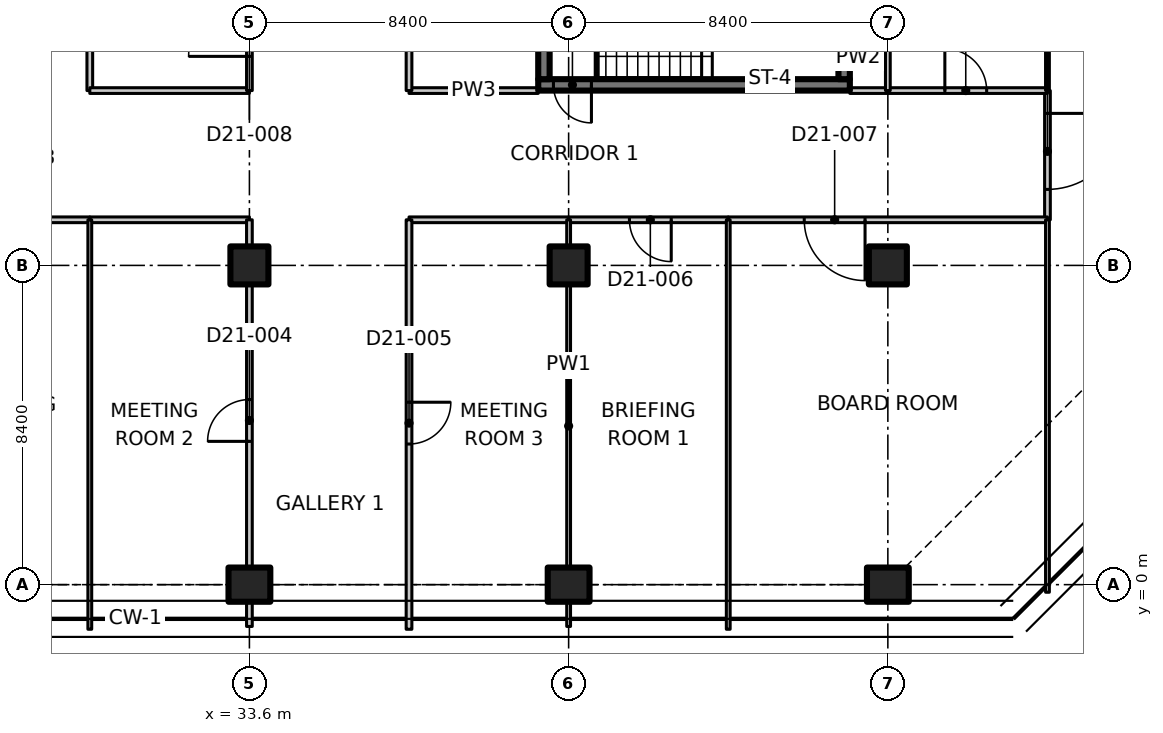
"""IFC4 building model, lengths in metres.
Left out: names, types, materials, properties, quantities, classifications, styles, units other than length and angle.
Written with IfcOpenShell. Run it as: python <this file> out.ifc"""

import sys

from ifc_helpers import new_model, si_unit, direction, frame, frame_2d, origin, origin_2d, place, context, subcontext, project, spatial, polyline, rectangle, outline, extrude, element, fill, save


model = new_model("IFC4")
c1 = context("Model", 3, precision=1e-05, world=origin(), true_north=direction((0.0, 1.0)))
c2 = subcontext(c1, "Body", "Model", "MODEL_VIEW")
j1 = project(units=[si_unit("LENGTHUNIT", "METRE"), si_unit("PLANEANGLEUNIT", "RADIAN")], contexts=[c1])
p1 = place(None, origin())
s1 = spatial("IfcSite", under=j1, at=p1, CompositionType="ELEMENT")
p2 = place(p1, origin())
s2 = spatial("IfcBuilding", under=s1, at=p2, CompositionType="ELEMENT")
p3 = place(p2, frame((0.0, 0.0, 166.8)))
s3 = spatial("IfcBuildingStorey", under=s2, at=p3, CompositionType="ELEMENT", Elevation=166.8)
p4 = place(p3, frame((33.6, 0.0, 0.0), z_axis=(0.0, 0.0, 1.0), x_axis=(0.0, 1.0, 0.0)))
e1 = element("IfcColumn", 1, at=p4, inside=s3, PredefinedType="COLUMN", context=c2, shape_type="SweptSolid", body=[
    extrude(rectangle(XDim=0.9, YDim=1.1, at=origin_2d()), origin(), (0.0, 0.0, 1.0), 3.35),
])
p5 = place(p3, frame((33.6, 8.4, 0.0), z_axis=(0.0, 0.0, 1.0), x_axis=(1.0, 0.0, 0.0)))
e2 = element("IfcColumn", 2, at=p5, inside=s3, PredefinedType="COLUMN", context=c2, shape_type="SweptSolid", body=[
    extrude(rectangle(XDim=1.0, YDim=1.0, at=origin_2d()), origin(), (0.0, 0.0, 1.0), 3.35),
])
p6 = place(p3, frame((42.0, 0.0, 0.0), z_axis=(0.0, 0.0, 1.0), x_axis=(0.0, 1.0, 0.0)))
e3 = element("IfcColumn", 3, at=p6, inside=s3, PredefinedType="COLUMN", context=c2, shape_type="SweptSolid", body=[
    extrude(rectangle(XDim=0.9, YDim=1.1, at=origin_2d()), origin(), (0.0, 0.0, 1.0), 3.35),
])
p7 = place(p3, frame((42.0, 8.4, 0.0), z_axis=(0.0, 0.0, 1.0), x_axis=(1.0, 0.0, 0.0)))
e4 = element("IfcColumn", 4, at=p7, inside=s3, PredefinedType="COLUMN", context=c2, shape_type="SweptSolid", body=[
    extrude(rectangle(XDim=1.0, YDim=1.0, at=origin_2d()), origin(), (0.0, 0.0, 1.0), 3.35),
])
p8 = place(p3, frame((50.4, 0.0, 0.0), z_axis=(0.0, 0.0, 1.0), x_axis=(0.0, 1.0, 0.0)))
e5 = element("IfcColumn", 5, at=p8, inside=s3, PredefinedType="COLUMN", context=c2, shape_type="SweptSolid", body=[
    extrude(rectangle(XDim=0.9, YDim=1.1, at=origin_2d()), origin(), (0.0, 0.0, 1.0), 3.35),
])
p9 = place(p3, frame((50.4, 8.4, 0.0), z_axis=(0.0, 0.0, 1.0), x_axis=(1.0, 0.0, 0.0)))
e6 = element("IfcColumn", 6, at=p9, inside=s3, PredefinedType="COLUMN", context=c2, shape_type="SweptSolid", body=[
    extrude(rectangle(XDim=1.0, YDim=1.0, at=origin_2d()), origin(), (0.0, 0.0, 1.0), 3.35),
])
p10 = place(p3, frame((49.4, 13.15, 0.0), z_axis=(0.0, 0.0, 1.0), x_axis=(-1.0, 0.0, 0.0)))
e7 = element("IfcWall", 7, at=p10, inside=s3, PredefinedType="SHEAR", context=c2, shape_type="SweptSolid", body=[
    extrude(rectangle(XDim=8.2, YDim=0.3, at=frame_2d((4.1, 0.0))), origin(), (0.0, 0.0, 1.0), 3.35),
])
p11 = place(p10, frame((6.8, 0.0, 0.0)))
e8 = element("IfcOpeningElement", 8, at=p11, cuts=e7, PredefinedType="OPENING", context=c2, shape_type="SweptSolid", body=[
    extrude(rectangle(XDim=1.0, YDim=2.1, at=frame_2d((0.5, 1.05))), frame((0.0, 0.16, 0.0), z_axis=(0.0, -1.0, 0.0), x_axis=(1.0, 0.0, 0.0)), (0.0, 0.0, 1.0), 0.32),
])
for number, where, z_axis, x_axis in (
    (9, (41.35, 13.3, 0.0), (0.0, 0.0, 1.0), (0.0, 1.0, 0.0)),
    (10, (49.25, 13.3, 0.0), (0.0, 0.0, 1.0), (0.0, 1.0, 0.0)),
):
    element("IfcWall", number, at=place(p3, frame(where, z_axis=z_axis, x_axis=x_axis)), inside=s3, PredefinedType="SHEAR", context=c2, shape_type="SweptSolid", body=[
        extrude(rectangle(XDim=2.55, YDim=0.3, at=frame_2d((1.275, 0.0))), origin(), (0.0, 0.0, 1.0), 3.35),
    ])
p12 = place(p3, frame((29.4, 9.6, 0.0), z_axis=(0.0, 0.0, 1.0), x_axis=(-1.0, 0.0, 0.0)))
e11 = element("IfcWall", 11, at=p12, inside=s3, PredefinedType="PARTITIONING", context=c2, shape_type="SweptSolid", body=[
    extrude(rectangle(XDim=4.2, YDim=0.15, at=frame_2d((2.1, 0.0))), origin(), (0.0, 0.0, 1.0), 3.33),
])
p13 = place(p12, frame((1.5, 0.0, 0.0)))
e12 = element("IfcOpeningElement", 12, at=p13, cuts=e11, PredefinedType="OPENING", context=c2, shape_type="SweptSolid", body=[
    extrude(rectangle(XDim=1.1, YDim=2.1, at=frame_2d((0.55, 1.05))), frame((0.0, 0.085, 0.0), z_axis=(0.0, -1.0, 0.0), x_axis=(1.0, 0.0, 0.0)), (0.0, 0.0, 1.0), 0.17),
])
p14 = place(p3, frame((29.4, 21.2, 0.0), z_axis=(0.0, 0.0, 1.0), x_axis=(0.0, -1.0, 0.0)))
e13 = element("IfcWall", 13, at=p14, inside=s3, PredefinedType="PARTITIONING", context=c2, shape_type="SweptSolid", body=[
    extrude(rectangle(XDim=8.2, YDim=0.15, at=frame_2d((4.1, 0.0))), origin(), (0.0, 0.0, 1.0), 3.33),
])
p15 = place(p3, frame((54.6, 13.0, 0.0), z_axis=(0.0, 0.0, 1.0), x_axis=(0.0, -1.0, 0.0)))
e14 = element("IfcWall", 14, at=p15, inside=s3, PredefinedType="PARTITIONING", context=c2, shape_type="SweptSolid", body=[
    extrude(rectangle(XDim=3.4, YDim=0.15, at=frame_2d((1.7, 0.0))), origin(), (0.0, 0.0, 1.0), 3.33),
])
p16 = place(p15, frame((0.6, 0.0, 0.0)))
e15 = element("IfcOpeningElement", 15, at=p16, cuts=e14, PredefinedType="OPENING", context=c2, shape_type="SweptSolid", body=[
    extrude(rectangle(XDim=2.0, YDim=2.4, at=frame_2d((1.0, 1.2))), frame((0.0, 0.085, 0.0), z_axis=(0.0, -1.0, 0.0), x_axis=(1.0, 0.0, 0.0)), (0.0, 0.0, 1.0), 0.17),
])
p17 = place(p3, frame((33.6, 9.6, 0.0), z_axis=(0.0, 0.0, 1.0), x_axis=(-1.0, 0.0, 0.0)))
e16 = element("IfcWall", 16, at=p17, inside=s3, PredefinedType="PARTITIONING", context=c2, shape_type="SweptSolid", body=[
    extrude(rectangle(XDim=4.2, YDim=0.15, at=frame_2d((2.1, 0.0))), origin(), (0.0, 0.0, 1.0), 3.33),
])
p18 = place(p3, frame((42.0, 9.6, 0.0), z_axis=(0.0, 0.0, 1.0), x_axis=(-1.0, 0.0, 0.0)))
e17 = element("IfcWall", 17, at=p18, inside=s3, PredefinedType="PARTITIONING", context=c2, shape_type="SweptSolid", body=[
    extrude(rectangle(XDim=4.2, YDim=0.15, at=frame_2d((2.1, 0.0))), origin(), (0.0, 0.0, 1.0), 3.33),
])
p19 = place(p3, frame((46.2, 9.6, 0.0), z_axis=(0.0, 0.0, 1.0), x_axis=(-1.0, 0.0, 0.0)))
e18 = element("IfcWall", 18, at=p19, inside=s3, PredefinedType="PARTITIONING", context=c2, shape_type="SweptSolid", body=[
    extrude(rectangle(XDim=4.2, YDim=0.15, at=frame_2d((2.1, 0.0))), origin(), (0.0, 0.0, 1.0), 3.33),
])
p20 = place(p19, frame((1.5, 0.0, 0.0)))
e19 = element("IfcOpeningElement", 19, at=p20, cuts=e18, PredefinedType="OPENING", context=c2, shape_type="SweptSolid", body=[
    extrude(rectangle(XDim=1.1, YDim=2.1, at=frame_2d((0.55, 1.05))), frame((0.0, 0.085, 0.0), z_axis=(0.0, -1.0, 0.0), x_axis=(1.0, 0.0, 0.0)), (0.0, 0.0, 1.0), 0.17),
])
p21 = place(p3, frame((54.6, 9.6, 0.0), z_axis=(0.0, 0.0, 1.0), x_axis=(-1.0, 0.0, 0.0)))
e20 = element("IfcWall", 20, at=p21, inside=s3, PredefinedType="PARTITIONING", context=c2, shape_type="SweptSolid", body=[
    extrude(rectangle(XDim=8.4, YDim=0.15, at=frame_2d((4.2, 0.0))), origin(), (0.0, 0.0, 1.0), 3.33),
])
p22 = place(p21, frame((4.8, 0.0, 0.0)))
e21 = element("IfcOpeningElement", 21, at=p22, cuts=e20, PredefinedType="OPENING", context=c2, shape_type="SweptSolid", body=[
    extrude(rectangle(XDim=1.6, YDim=2.1, at=frame_2d((0.8, 1.05))), frame((0.0, 0.085, 0.0), z_axis=(0.0, -1.0, 0.0), x_axis=(1.0, 0.0, 0.0)), (0.0, 0.0, 1.0), 0.17),
])
p23 = place(p3, frame((29.4, 13.0, 0.0), z_axis=(0.0, 0.0, 1.0), x_axis=(1.0, 0.0, 0.0)))
e22 = element("IfcWall", 22, at=p23, inside=s3, PredefinedType="PARTITIONING", context=c2, shape_type="SweptSolid", body=[
    extrude(rectangle(XDim=4.2, YDim=0.15, at=frame_2d((2.1, 0.0))), origin(), (0.0, 0.0, 1.0), 3.33),
])
p24 = place(p3, frame((37.8, 13.0, 0.0), z_axis=(0.0, 0.0, 1.0), x_axis=(1.0, 0.0, 0.0)))
e23 = element("IfcWall", 23, at=p24, inside=s3, PredefinedType="PARTITIONING", context=c2, shape_type="SweptSolid", body=[
    extrude(rectangle(XDim=3.4, YDim=0.15, at=frame_2d((1.7, 0.0))), origin(), (0.0, 0.0, 1.0), 3.33),
])
p25 = place(p3, frame((49.4, 13.0, 0.0), z_axis=(0.0, 0.0, 1.0), x_axis=(1.0, 0.0, 0.0)))
e24 = element("IfcWall", 24, at=p25, inside=s3, PredefinedType="PARTITIONING", context=c2, shape_type="SweptSolid", body=[
    extrude(rectangle(XDim=1.0, YDim=0.15, at=frame_2d((0.5, 0.0))), origin(), (0.0, 0.0, 1.0), 3.33),
])
p26 = place(p3, frame((50.4, 13.0, 0.0), z_axis=(0.0, 0.0, 1.0), x_axis=(1.0, 0.0, 0.0)))
e25 = element("IfcWall", 25, at=p26, inside=s3, PredefinedType="PARTITIONING", context=c2, shape_type="SweptSolid", body=[
    extrude(rectangle(XDim=4.2, YDim=0.15, at=frame_2d((2.1, 0.0))), origin(), (0.0, 0.0, 1.0), 3.33),
])
p27 = place(p26, frame((1.5, 0.0, 0.0)))
e26 = element("IfcOpeningElement", 26, at=p27, cuts=e25, PredefinedType="OPENING", context=c2, shape_type="SweptSolid", body=[
    extrude(rectangle(XDim=1.1, YDim=2.1, at=frame_2d((0.55, 1.05))), frame((0.0, 0.085, 0.0), z_axis=(0.0, -1.0, 0.0), x_axis=(1.0, 0.0, 0.0)), (0.0, 0.0, 1.0), 0.17),
])
p28 = place(p3, frame((54.6, -0.2, 0.0), z_axis=(0.0, 0.0, 1.0), x_axis=(0.0, 1.0, 0.0)))
e27 = element("IfcWall", 27, at=p28, inside=s3, PredefinedType="PARTITIONING", context=c2, shape_type="SweptSolid", body=[
    extrude(outline(polyline([(0.0, 0.0), (9.8, 0.0), (9.8, 3.33), (5.066, 3.33), (5.064, 2.98), (3.736, 2.98), (3.734, 3.33), (0.0, 3.33), (0.0, 0.0)])), frame((0.0, 0.05, 0.0), z_axis=(0.0, -1.0, 0.0), x_axis=(1.0, 0.0, 0.0)), (0.0, 0.0, 1.0), 0.1),
])
p29 = place(p3, frame((54.6, 13.0, 0.0), z_axis=(0.0, 0.0, 1.0), x_axis=(0.0, 1.0, 0.0)))
e28 = element("IfcWall", 28, at=p29, inside=s3, PredefinedType="PARTITIONING", context=c2, shape_type="SweptSolid", body=[
    extrude(outline(polyline([(0.0, 0.0), (12.805, 0.0), (12.805, 3.33), (12.4, 3.33), (8.666, 3.33), (8.664, 2.98), (7.336, 2.98), (7.334, 3.33), (0.0, 3.33), (0.0, 0.0)])), frame((0.0, 0.05, 0.0), z_axis=(0.0, -1.0, 0.0), x_axis=(1.0, 0.0, 0.0)), (0.0, 0.0, 1.0), 0.1),
])
p30 = place(p3, frame((33.6, -1.1, 0.0), z_axis=(0.0, 0.0, 1.0), x_axis=(0.0, 1.0, 0.0)))
e29 = element("IfcWall", 29, at=p30, inside=s3, PredefinedType="PARTITIONING", context=c2, shape_type="SweptSolid", body=[
    extrude(rectangle(XDim=0.63, YDim=0.15, at=frame_2d((0.315, 0.0))), origin(), (0.0, 0.0, 1.0), 3.33),
])
p31 = place(p3, frame((33.6, 0.47, 0.0), z_axis=(0.0, 0.0, 1.0), x_axis=(0.0, 1.0, 0.0)))
e30 = element("IfcWall", 30, at=p31, inside=s3, PredefinedType="PARTITIONING", context=c2, shape_type="SweptSolid", body=[
    extrude(rectangle(XDim=7.41, YDim=0.15, at=frame_2d((3.705, 0.0))), origin(), (0.0, 0.0, 1.0), 3.33),
])
p32 = place(p31, frame((3.3, 0.0, 0.0)))
e31 = element("IfcOpeningElement", 31, at=p32, cuts=e30, PredefinedType="OPENING", context=c2, shape_type="SweptSolid", body=[
    extrude(rectangle(XDim=1.1, YDim=2.1, at=frame_2d((0.55, 1.05))), frame((0.0, 0.085, 0.0), z_axis=(0.0, -1.0, 0.0), x_axis=(1.0, 0.0, 0.0)), (0.0, 0.0, 1.0), 0.17),
])
p33 = place(p3, frame((33.6, 8.92, 0.0), z_axis=(0.0, 0.0, 1.0), x_axis=(0.0, 1.0, 0.0)))
e32 = element("IfcWall", 32, at=p33, inside=s3, PredefinedType="PARTITIONING", context=c2, shape_type="SweptSolid", body=[
    extrude(rectangle(XDim=0.68, YDim=0.15, at=frame_2d((0.34, 0.0))), origin(), (0.0, 0.0, 1.0), 3.33),
])
p34 = place(p3, frame((37.8, 9.6, 0.0), z_axis=(0.0, 0.0, 1.0), x_axis=(0.0, -1.0, 0.0)))
e33 = element("IfcWall", 33, at=p34, inside=s3, PredefinedType="PARTITIONING", context=c2, shape_type="SweptSolid", body=[
    extrude(outline(polyline([(0.0, 0.0), (10.774, 0.0), (10.774, 3.33), (10.7, 3.33), (10.05, 3.33), (10.048, 2.98), (9.152, 2.98), (9.15, 3.33), (0.0, 3.33), (0.0, 0.0)])), frame((0.0, 0.075, 0.0), z_axis=(0.0, -1.0, 0.0), x_axis=(1.0, 0.0, 0.0)), (0.0, 0.0, 1.0), 0.15),
])
p35 = place(p34, frame((4.8, 0.0, 0.0)))
e34 = element("IfcOpeningElement", 34, at=p35, cuts=e33, PredefinedType="OPENING", context=c2, shape_type="SweptSolid", body=[
    extrude(rectangle(XDim=1.1, YDim=2.1, at=frame_2d((0.55, 1.05))), frame((0.0, 0.085, 0.0), z_axis=(0.0, -1.0, 0.0), x_axis=(1.0, 0.0, 0.0)), (0.0, 0.0, 1.0), 0.17),
])
p36 = place(p3, frame((29.4, 9.6, 0.0), z_axis=(0.0, 0.0, 1.0), x_axis=(0.0, -1.0, 0.0)))
e35 = element("IfcWall", 35, at=p36, inside=s3, PredefinedType="PARTITIONING", context=c2, shape_type="SweptSolid", body=[
    extrude(outline(polyline([(0.0, 0.0), (10.774, 0.0), (10.774, 3.33), (10.7, 3.33), (10.05, 3.33), (10.048, 2.98), (9.152, 2.98), (9.15, 3.33), (0.0, 3.33), (0.0, 0.0)])), frame((0.0, 0.05, 0.0), z_axis=(0.0, -1.0, 0.0), x_axis=(1.0, 0.0, 0.0)), (0.0, 0.0, 1.0), 0.1),
])
p37 = place(p3, frame((42.0, 9.6, 0.0), z_axis=(0.0, 0.0, 1.0), x_axis=(0.0, -1.0, 0.0)))
e36 = element("IfcWall", 36, at=p37, inside=s3, PredefinedType="PARTITIONING", context=c2, shape_type="SweptSolid", body=[
    extrude(rectangle(XDim=0.68, YDim=0.1, at=frame_2d((0.34, 0.0))), origin(), (0.0, 0.0, 1.0), 3.33),
])
p38 = place(p3, frame((42.0, 7.88, 0.0), z_axis=(0.0, 0.0, 1.0), x_axis=(0.0, -1.0, 0.0)))
e37 = element("IfcWall", 37, at=p38, inside=s3, PredefinedType="PARTITIONING", context=c2, shape_type="SweptSolid", body=[
    extrude(rectangle(XDim=7.41, YDim=0.1, at=frame_2d((3.705, 0.0))), origin(), (0.0, 0.0, 1.0), 3.33),
])
p39 = place(p3, frame((42.0, -0.47, 0.0), z_axis=(0.0, 0.0, 1.0), x_axis=(0.0, -1.0, 0.0)))
e38 = element("IfcWall", 38, at=p39, inside=s3, PredefinedType="PARTITIONING", context=c2, shape_type="SweptSolid", body=[
    extrude(rectangle(XDim=0.63, YDim=0.1, at=frame_2d((0.315, 0.0))), origin(), (0.0, 0.0, 1.0), 3.33),
])
p40 = place(p3, frame((46.2, 9.6, 0.0), z_axis=(0.0, 0.0, 1.0), x_axis=(0.0, -1.0, 0.0)))
e39 = element("IfcWall", 39, at=p40, inside=s3, PredefinedType="PARTITIONING", context=c2, shape_type="SweptSolid", body=[
    extrude(outline(polyline([(0.0, 0.0), (10.774, 0.0), (10.774, 3.33), (10.7, 3.33), (10.05, 3.33), (10.048, 2.98), (9.152, 2.98), (9.15, 3.33), (0.0, 3.33), (0.0, 0.0)])), frame((0.0, 0.05, 0.0), z_axis=(0.0, -1.0, 0.0), x_axis=(1.0, 0.0, 0.0)), (0.0, 0.0, 1.0), 0.1),
])
p41 = place(p3, frame((33.6, 13.0, 0.0), z_axis=(0.0, 0.0, 1.0), x_axis=(0.0, 1.0, 0.0)))
e40 = element("IfcWall", 40, at=p41, inside=s3, PredefinedType="PARTITIONING", context=c2, shape_type="SweptSolid", body=[
    extrude(rectangle(XDim=3.28, YDim=0.15, at=frame_2d((1.64, 0.0))), origin(), (0.0, 0.0, 1.0), 3.33),
])
p42 = place(p41, frame((0.9, 0.0, 0.0)))
e41 = element("IfcOpeningElement", 41, at=p42, cuts=e40, PredefinedType="OPENING", context=c2, shape_type="SweptSolid", body=[
    extrude(rectangle(XDim=1.6, YDim=2.1, at=frame_2d((0.8, 1.05))), frame((0.0, 0.085, 0.0), z_axis=(0.0, -1.0, 0.0), x_axis=(1.0, 0.0, 0.0)), (0.0, 0.0, 1.0), 0.17),
])
p43 = place(p3, frame((37.8, 30.526, 0.0), z_axis=(0.0, 0.0, 1.0), x_axis=(0.0, -1.0, 0.0)))
e42 = element("IfcWall", 42, at=p43, inside=s3, PredefinedType="PARTITIONING", context=c2, shape_type="SweptSolid", body=[
    extrude(outline(polyline([(0.0, 0.0), (17.526, 0.0), (17.526, 3.33), (5.776, 3.33), (5.774, 2.98), (4.878, 2.98), (4.876, 3.33), (0.283, 3.33), (0.0, 3.33), (0.0, 0.0)])), frame((0.0, 0.075, 0.0), z_axis=(0.0, -1.0, 0.0), x_axis=(1.0, 0.0, 0.0)), (0.0, 0.0, 1.0), 0.15),
])
p44 = place(p43, frame((8.283, 0.0, 0.0)))
e43 = element("IfcOpeningElement", 43, at=p44, cuts=e42, PredefinedType="OPENING", context=c2, shape_type="SweptSolid", body=[
    extrude(rectangle(XDim=1.6, YDim=2.1, at=frame_2d((0.8, 1.05))), frame((0.0, 0.085, 0.0), z_axis=(0.0, -1.0, 0.0), x_axis=(1.0, 0.0, 0.0)), (0.0, 0.0, 1.0), 0.17),
])
p45 = place(p3, frame((50.4, 16.28, 0.0), z_axis=(0.0, 0.0, 1.0), x_axis=(0.0, -1.0, 0.0)))
e44 = element("IfcWall", 44, at=p45, inside=s3, PredefinedType="PARTITIONING", context=c2, shape_type="SweptSolid", body=[
    extrude(rectangle(XDim=3.28, YDim=0.125, at=frame_2d((1.64, 0.0))), origin(), (0.0, 0.0, 1.0), 3.33),
])
p46 = place(p11, origin())
e45 = element("IfcDoor", 45, at=p46, inside=s3, OperationType="SINGLE_SWING_LEFT", PredefinedType="DOOR", context=c2, shape_type="SweptSolid", body=[
    extrude(rectangle(XDim=1.0, YDim=2.1, at=frame_2d((0.5, 1.05))), frame((0.0, 0.025, 0.0), z_axis=(0.0, -1.0, 0.0), x_axis=(1.0, 0.0, 0.0)), (0.0, 0.0, 1.0), 0.05),
])
fill(e8, e45)
p47 = place(p16, origin())
e46 = element("IfcDoor", 46, at=p47, inside=s3, OperationType="DOUBLE_DOOR_SINGLE_SWING", PredefinedType="DOOR", context=c2, shape_type="SweptSolid", body=[
    extrude(rectangle(XDim=2.0, YDim=2.4, at=frame_2d((1.0, 1.2))), frame((0.0, 0.025, 0.0), z_axis=(0.0, -1.0, 0.0), x_axis=(1.0, 0.0, 0.0)), (0.0, 0.0, 1.0), 0.05),
])
fill(e15, e46)
p48 = place(p32, origin())
e47 = element("IfcDoor", 47, at=p48, inside=s3, OperationType="SINGLE_SWING_LEFT", PredefinedType="DOOR", context=c2, shape_type="SweptSolid", body=[
    extrude(rectangle(XDim=1.1, YDim=2.1, at=frame_2d((0.55, 1.05))), frame((0.0, 0.025, 0.0), z_axis=(0.0, -1.0, 0.0), x_axis=(1.0, 0.0, 0.0)), (0.0, 0.0, 1.0), 0.05),
])
fill(e31, e47)
p49 = place(p35, origin())
e48 = element("IfcDoor", 48, at=p49, inside=s3, OperationType="SINGLE_SWING_LEFT", PredefinedType="DOOR", context=c2, shape_type="SweptSolid", body=[
    extrude(rectangle(XDim=1.1, YDim=2.1, at=frame_2d((0.55, 1.05))), frame((0.0, 0.025, 0.0), z_axis=(0.0, -1.0, 0.0), x_axis=(1.0, 0.0, 0.0)), (0.0, 0.0, 1.0), 0.05),
])
fill(e34, e48)
p50 = place(p20, origin())
e49 = element("IfcDoor", 49, at=p50, inside=s3, OperationType="SINGLE_SWING_LEFT", PredefinedType="DOOR", context=c2, shape_type="SweptSolid", body=[
    extrude(rectangle(XDim=1.1, YDim=2.1, at=frame_2d((0.55, 1.05))), frame((0.0, 0.025, 0.0), z_axis=(0.0, -1.0, 0.0), x_axis=(1.0, 0.0, 0.0)), (0.0, 0.0, 1.0), 0.05),
])
fill(e19, e49)
p51 = place(p22, origin())
e50 = element("IfcDoor", 50, at=p51, inside=s3, OperationType="DOUBLE_DOOR_SINGLE_SWING", PredefinedType="DOOR", context=c2, shape_type="SweptSolid", body=[
    extrude(rectangle(XDim=1.6, YDim=2.1, at=frame_2d((0.8, 1.05))), frame((0.0, 0.025, 0.0), z_axis=(0.0, -1.0, 0.0), x_axis=(1.0, 0.0, 0.0)), (0.0, 0.0, 1.0), 0.05),
])
fill(e21, e50)
p52 = place(p42, origin())
e51 = element("IfcDoor", 51, at=p52, inside=s3, OperationType="DOUBLE_DOOR_SINGLE_SWING", PredefinedType="DOOR", context=c2, shape_type="SweptSolid", body=[
    extrude(rectangle(XDim=1.6, YDim=2.1, at=frame_2d((0.8, 1.05))), frame((0.0, 0.025, 0.0), z_axis=(0.0, -1.0, 0.0), x_axis=(1.0, 0.0, 0.0)), (0.0, 0.0, 1.0), 0.05),
])
fill(e41, e51)
p53 = place(p27, origin())
e52 = element("IfcDoor", 52, at=p53, inside=s3, OperationType="SINGLE_SWING_LEFT", PredefinedType="DOOR", context=c2, shape_type="SweptSolid", body=[
    extrude(rectangle(XDim=1.1, YDim=2.1, at=frame_2d((0.55, 1.05))), frame((0.0, 0.025, 0.0), z_axis=(0.0, -1.0, 0.0), x_axis=(1.0, 0.0, 0.0)), (0.0, 0.0, 1.0), 0.05),
])
fill(e26, e52)
save(model, sys.argv[1])
